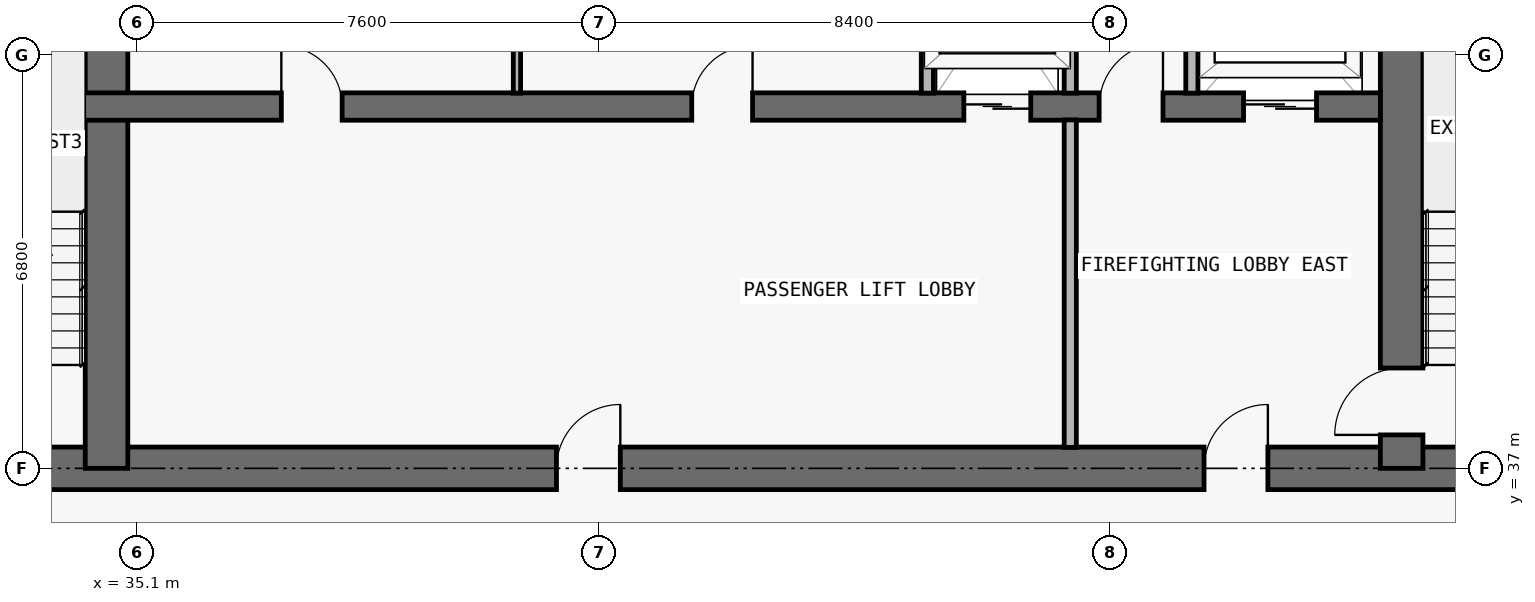
"""IFC4 building model, lengths in metres.
Left out: names, types, materials, properties, quantities, classifications, styles, units other than length and angle.
Written with IfcOpenShell. Run it as: python <this file> out.ifc"""

import sys

from ifc_helpers import new_model, si_unit, direction, frame, frame_2d, origin, place, context, subcontext, project, spatial, rectangle, extrude, element, fill, save


model = new_model("IFC4")
c1 = context("Model", 3, precision=1e-05, world=origin(), true_north=direction((0.0, 1.0)))
c2 = subcontext(c1, "Body", "Model", "MODEL_VIEW")
j1 = project(units=[si_unit("LENGTHUNIT", "METRE"), si_unit("PLANEANGLEUNIT", "RADIAN")], contexts=[c1])
p1 = place(None, origin())
s1 = spatial("IfcSite", under=j1, at=p1, CompositionType="ELEMENT")
p2 = place(p1, origin())
s2 = spatial("IfcBuilding", under=s1, at=p2, CompositionType="ELEMENT")
p3 = place(p2, frame((0.0, 0.0, 233.1)))
s3 = spatial("IfcBuildingStorey", under=s2, at=p3, CompositionType="ELEMENT", Elevation=233.1)
p4 = place(p3, frame((17.95, 37.0, 0.0), z_axis=(0.0, 0.0, 1.0), x_axis=(1.0, 0.0, 0.0)))
e1 = element("IfcWall", 1, at=p4, inside=s3, PredefinedType="SHEAR", context=c2, shape_type="SweptSolid", body=[
    extrude(rectangle(XDim=41.9, YDim=0.7, at=frame_2d((20.95, 0.0))), origin(), (0.0, 0.0, 1.0), 3.05),
])
p5 = place(p4, frame((14.35, 0.0, 0.0)))
e2 = element("IfcOpeningElement", 2, at=p5, cuts=e1, PredefinedType="OPENING", context=c2, shape_type="SweptSolid", body=[
    extrude(rectangle(XDim=1.1, YDim=2.15, at=frame_2d((0.55, 1.075))), frame((0.0, 0.36, 0.0), z_axis=(0.0, -1.0, 0.0), x_axis=(1.0, 0.0, 0.0)), (0.0, 0.0, 1.0), 0.72),
])
p6 = place(p4, frame((6.2, 0.0, 0.0)))
e3 = element("IfcOpeningElement", 3, at=p6, cuts=e1, PredefinedType="OPENING", context=c2, shape_type="SweptSolid", body=[
    extrude(rectangle(XDim=1.05, YDim=2.15, at=frame_2d((0.525, 1.075))), frame((0.0, 0.36, 0.0), z_axis=(0.0, -1.0, 0.0), x_axis=(1.0, 0.0, 0.0)), (0.0, 0.0, 1.0), 0.72),
])
p7 = place(p4, frame((34.7, 0.0, 0.0)))
e4 = element("IfcOpeningElement", 4, at=p7, cuts=e1, PredefinedType="OPENING", context=c2, shape_type="SweptSolid", body=[
    extrude(rectangle(XDim=1.05, YDim=2.15, at=frame_2d((0.525, 1.075))), frame((0.0, 0.36, 0.0), z_axis=(0.0, -1.0, 0.0), x_axis=(1.0, 0.0, 0.0)), (0.0, 0.0, 1.0), 0.72),
])
p8 = place(p4, frame((10.812, 0.0, 0.0)))
e5 = element("IfcOpeningElement", 5, at=p8, cuts=e1, PredefinedType="OPENING", context=c2, shape_type="SweptSolid", body=[
    extrude(rectangle(XDim=1.05, YDim=2.15, at=frame_2d((0.525, 1.075))), frame((0.0, 0.36, 0.0), z_axis=(0.0, -1.0, 0.0), x_axis=(1.0, 0.0, 0.0)), (0.0, 0.0, 1.0), 0.72),
])
p9 = place(p4, frame((24.05, 0.0, 0.0)))
e6 = element("IfcOpeningElement", 6, at=p9, cuts=e1, PredefinedType="OPENING", context=c2, shape_type="SweptSolid", body=[
    extrude(rectangle(XDim=1.05, YDim=2.15, at=frame_2d((0.525, 1.075))), frame((0.0, 0.36, 0.0), z_axis=(0.0, -1.0, 0.0), x_axis=(1.0, 0.0, 0.0)), (0.0, 0.0, 1.0), 0.72),
])
p10 = place(p3, frame((55.9, 37.0, 0.0), z_axis=(0.0, 0.0, 1.0), x_axis=(0.0, 1.0, 0.0)))
e7 = element("IfcWall", 7, at=p10, inside=s3, PredefinedType="SHEAR", context=c2, shape_type="SweptSolid", body=[
    extrude(rectangle(XDim=9.575, YDim=0.7, at=frame_2d((4.788, 0.0))), origin(), (0.0, 0.0, 1.0), 3.05),
])
p11 = place(p10, frame((0.55, 0.0, 0.0)))
e8 = element("IfcOpeningElement", 8, at=p11, cuts=e7, PredefinedType="OPENING", context=c2, shape_type="SweptSolid", body=[
    extrude(rectangle(XDim=1.1, YDim=2.15, at=frame_2d((0.55, 1.075))), frame((0.0, 0.36, 0.0), z_axis=(0.0, -1.0, 0.0), x_axis=(1.0, 0.0, 0.0)), (0.0, 0.0, 1.0), 0.72),
])
p12 = place(p3, frame((34.6, 37.0, 0.0), z_axis=(0.0, 0.0, 1.0), x_axis=(0.0, 1.0, 0.0)))
e9 = element("IfcWall", 9, at=p12, inside=s3, PredefinedType="SHEAR", context=c2, shape_type="SweptSolid", body=[
    extrude(rectangle(XDim=9.575, YDim=0.7, at=frame_2d((4.788, 0.0))), origin(), (0.0, 0.0, 1.0), 3.05),
])
p13 = place(p3, frame((22.25, 42.95, 0.0), z_axis=(0.0, 0.0, 1.0), x_axis=(1.0, 0.0, 0.0)))
e10 = element("IfcWall", 10, at=p13, inside=s3, PredefinedType="SHEAR", context=c2, shape_type="SweptSolid", body=[
    extrude(rectangle(XDim=33.3, YDim=0.45, at=frame_2d((16.65, 0.0))), origin(), (0.0, 0.0, 1.0), 3.05),
])
p14 = place(p13, frame((1.05, 0.0, 0.0)))
e11 = element("IfcOpeningElement", 11, at=p14, cuts=e10, PredefinedType="OPENING", context=c2, shape_type="SweptSolid", body=[
    extrude(rectangle(XDim=1.2, YDim=2.2, at=frame_2d((0.6, 1.1))), frame((0.0, 0.235, 0.0), z_axis=(0.0, -1.0, 0.0), x_axis=(1.0, 0.0, 0.0)), (0.0, 0.0, 1.0), 0.47),
])
p15 = place(p13, frame((31.05, 0.0, 0.0)))
e12 = element("IfcOpeningElement", 12, at=p15, cuts=e10, PredefinedType="OPENING", context=c2, shape_type="SweptSolid", body=[
    extrude(rectangle(XDim=1.2, YDim=2.2, at=frame_2d((0.6, 1.1))), frame((0.0, 0.235, 0.0), z_axis=(0.0, -1.0, 0.0), x_axis=(1.0, 0.0, 0.0)), (0.0, 0.0, 1.0), 0.47),
])
p16 = place(p13, frame((26.45, 0.0, 0.0)))
e13 = element("IfcOpeningElement", 13, at=p16, cuts=e10, PredefinedType="OPENING", context=c2, shape_type="SweptSolid", body=[
    extrude(rectangle(XDim=1.1, YDim=2.2, at=frame_2d((0.55, 1.1))), frame((0.0, 0.235, 0.0), z_axis=(0.0, -1.0, 0.0), x_axis=(1.0, 0.0, 0.0)), (0.0, 0.0, 1.0), 0.47),
])
p17 = place(p13, frame((5.95, 0.0, 0.0)))
e14 = element("IfcOpeningElement", 14, at=p17, cuts=e10, PredefinedType="OPENING", context=c2, shape_type="SweptSolid", body=[
    extrude(rectangle(XDim=1.1, YDim=2.2, at=frame_2d((0.55, 1.1))), frame((0.0, 0.235, 0.0), z_axis=(0.0, -1.0, 0.0), x_axis=(1.0, 0.0, 0.0)), (0.0, 0.0, 1.0), 0.47),
])
p18 = place(p13, frame((3.625, 0.0, 0.0)))
e15 = element("IfcOpeningElement", 15, at=p18, cuts=e10, PredefinedType="OPENING", context=c2, shape_type="SweptSolid", body=[
    extrude(rectangle(XDim=1.05, YDim=2.15, at=frame_2d((0.525, 1.075))), frame((0.0, 0.235, 0.0), z_axis=(0.0, -1.0, 0.0), x_axis=(1.0, 0.0, 0.0)), (0.0, 0.0, 1.0), 0.47),
])
p19 = place(p13, frame((28.675, 0.0, 0.0)))
e16 = element("IfcOpeningElement", 16, at=p19, cuts=e10, PredefinedType="OPENING", context=c2, shape_type="SweptSolid", body=[
    extrude(rectangle(XDim=1.05, YDim=2.15, at=frame_2d((0.525, 1.075))), frame((0.0, 0.235, 0.0), z_axis=(0.0, -1.0, 0.0), x_axis=(1.0, 0.0, 0.0)), (0.0, 0.0, 1.0), 0.47),
])
p20 = place(p13, frame((15.225, 0.0, 0.0)))
e17 = element("IfcOpeningElement", 17, at=p20, cuts=e10, PredefinedType="OPENING", context=c2, shape_type="SweptSolid", body=[
    extrude(rectangle(XDim=1.0, YDim=2.2, at=frame_2d((0.5, 1.1))), frame((0.0, 0.235, 0.0), z_axis=(0.0, -1.0, 0.0), x_axis=(1.0, 0.0, 0.0)), (0.0, 0.0, 1.0), 0.47),
])
p21 = place(p13, frame((21.975, 0.0, 0.0)))
e18 = element("IfcOpeningElement", 18, at=p21, cuts=e10, PredefinedType="OPENING", context=c2, shape_type="SweptSolid", body=[
    extrude(rectangle(XDim=1.0, YDim=2.2, at=frame_2d((0.5, 1.1))), frame((0.0, 0.235, 0.0), z_axis=(0.0, -1.0, 0.0), x_axis=(1.0, 0.0, 0.0)), (0.0, 0.0, 1.0), 0.47),
])
p22 = place(p3, frame((41.35, 43.17, 0.0), z_axis=(0.0, 0.0, 1.0), x_axis=(0.0, 1.0, 0.0)))
e19 = element("IfcWall", 19, at=p22, inside=s3, PredefinedType="PARTITIONING", context=c2, shape_type="SweptSolid", body=[
    extrude(rectangle(XDim=3.185, YDim=0.12, at=frame_2d((1.593, 0.0))), origin(), (0.0, 0.0, 1.0), 3.05),
])
p23 = place(p3, frame((48.1, 43.17, 0.0), z_axis=(0.0, 0.0, 1.0), x_axis=(0.0, 1.0, 0.0)))
e20 = element("IfcWall", 20, at=p23, inside=s3, PredefinedType="PARTITIONING", context=c2, shape_type="SweptSolid", body=[
    extrude(rectangle(XDim=3.185, YDim=0.2, at=frame_2d((1.593, 0.0))), origin(), (0.0, 0.0, 1.0), 3.05),
])
p24 = place(p3, frame((50.45, 37.345, 0.0), z_axis=(0.0, 0.0, 1.0), x_axis=(0.0, 1.0, 0.0)))
e21 = element("IfcWall", 21, at=p24, inside=s3, PredefinedType="PARTITIONING", context=c2, shape_type="SweptSolid", body=[
    extrude(rectangle(XDim=5.385, YDim=0.2, at=frame_2d((2.692, 0.0))), origin(), (0.0, 0.0, 1.0), 3.05),
])
for number, where, z_axis, x_axis in (
    (22, (50.45, 43.17, 0.0), (0.0, 0.0, 1.0), (0.0, 1.0, 0.0)),
    (23, (52.45, 43.17, 0.0), (0.0, 0.0, 1.0), (0.0, 1.0, 0.0)),
):
    element("IfcWall", number, at=place(p3, frame(where, z_axis=z_axis, x_axis=x_axis)), inside=s3, PredefinedType="PARTITIONING", context=c2, shape_type="SweptSolid", body=[
        extrude(rectangle(XDim=3.185, YDim=0.2, at=frame_2d((1.593, 0.0))), origin(), (0.0, 0.0, 1.0), 3.05),
    ])
p25 = place(p15, origin())
e24 = element("IfcDoor", 24, at=p25, inside=s3, OperationType="DOUBLE_DOOR_SLIDING", PredefinedType="DOOR", context=c2, shape_type="SweptSolid", body=[
    extrude(rectangle(XDim=1.2, YDim=2.2, at=frame_2d((0.6, 1.1))), frame((0.0, 0.025, 0.0), z_axis=(0.0, -1.0, 0.0), x_axis=(1.0, 0.0, 0.0)), (0.0, 0.0, 1.0), 0.05),
])
fill(e12, e24)
p26 = place(p16, origin())
e25 = element("IfcDoor", 25, at=p26, inside=s3, OperationType="DOUBLE_DOOR_SLIDING", PredefinedType="DOOR", context=c2, shape_type="SweptSolid", body=[
    extrude(rectangle(XDim=1.1, YDim=2.2, at=frame_2d((0.55, 1.1))), frame((0.0, 0.025, 0.0), z_axis=(0.0, -1.0, 0.0), x_axis=(1.0, 0.0, 0.0)), (0.0, 0.0, 1.0), 0.05),
])
fill(e13, e25)
p27 = place(p7, origin())
e26 = element("IfcDoor", 26, at=p27, inside=s3, OperationType="SINGLE_SWING_RIGHT", PredefinedType="DOOR", context=c2, shape_type="SweptSolid", body=[
    extrude(rectangle(XDim=1.05, YDim=2.15, at=frame_2d((0.525, 1.075))), frame((0.0, 0.025, 0.0), z_axis=(0.0, -1.0, 0.0), x_axis=(1.0, 0.0, 0.0)), (0.0, 0.0, 1.0), 0.05),
])
fill(e4, e26)
p28 = place(p11, origin())
e27 = element("IfcDoor", 27, at=p28, inside=s3, OperationType="SINGLE_SWING_LEFT", PredefinedType="DOOR", context=c2, shape_type="SweptSolid", body=[
    extrude(rectangle(XDim=1.1, YDim=2.15, at=frame_2d((0.55, 1.075))), frame((0.0, 0.025, 0.0), z_axis=(0.0, -1.0, 0.0), x_axis=(1.0, 0.0, 0.0)), (0.0, 0.0, 1.0), 0.05),
])
fill(e8, e27)
p29 = place(p19, origin())
e28 = element("IfcDoor", 28, at=p29, inside=s3, OperationType="SINGLE_SWING_RIGHT", PredefinedType="DOOR", context=c2, shape_type="SweptSolid", body=[
    extrude(rectangle(XDim=1.05, YDim=2.15, at=frame_2d((0.525, 1.075))), frame((0.0, 0.025, 0.0), z_axis=(0.0, -1.0, 0.0), x_axis=(1.0, 0.0, 0.0)), (0.0, 0.0, 1.0), 0.05),
])
fill(e16, e28)
p30 = place(p9, origin())
e29 = element("IfcDoor", 29, at=p30, inside=s3, OperationType="SINGLE_SWING_RIGHT", PredefinedType="DOOR", context=c2, shape_type="SweptSolid", body=[
    extrude(rectangle(XDim=1.05, YDim=2.15, at=frame_2d((0.525, 1.075))), frame((0.0, 0.025, 0.0), z_axis=(0.0, -1.0, 0.0), x_axis=(1.0, 0.0, 0.0)), (0.0, 0.0, 1.0), 0.05),
])
fill(e6, e29)
p31 = place(p20, origin())
e30 = element("IfcDoor", 30, at=p31, inside=s3, OperationType="SINGLE_SWING_LEFT", PredefinedType="DOOR", context=c2, shape_type="SweptSolid", body=[
    extrude(rectangle(XDim=1.0, YDim=2.2, at=frame_2d((0.5, 1.1))), frame((0.0, 0.025, 0.0), z_axis=(0.0, -1.0, 0.0), x_axis=(1.0, 0.0, 0.0)), (0.0, 0.0, 1.0), 0.05),
])
fill(e17, e30)
p32 = place(p21, origin())
e31 = element("IfcDoor", 31, at=p32, inside=s3, OperationType="SINGLE_SWING_RIGHT", PredefinedType="DOOR", context=c2, shape_type="SweptSolid", body=[
    extrude(rectangle(XDim=1.0, YDim=2.2, at=frame_2d((0.5, 1.1))), frame((0.0, 0.025, 0.0), z_axis=(0.0, -1.0, 0.0), x_axis=(1.0, 0.0, 0.0)), (0.0, 0.0, 1.0), 0.05),
])
fill(e18, e31)
save(model, sys.argv[1])
